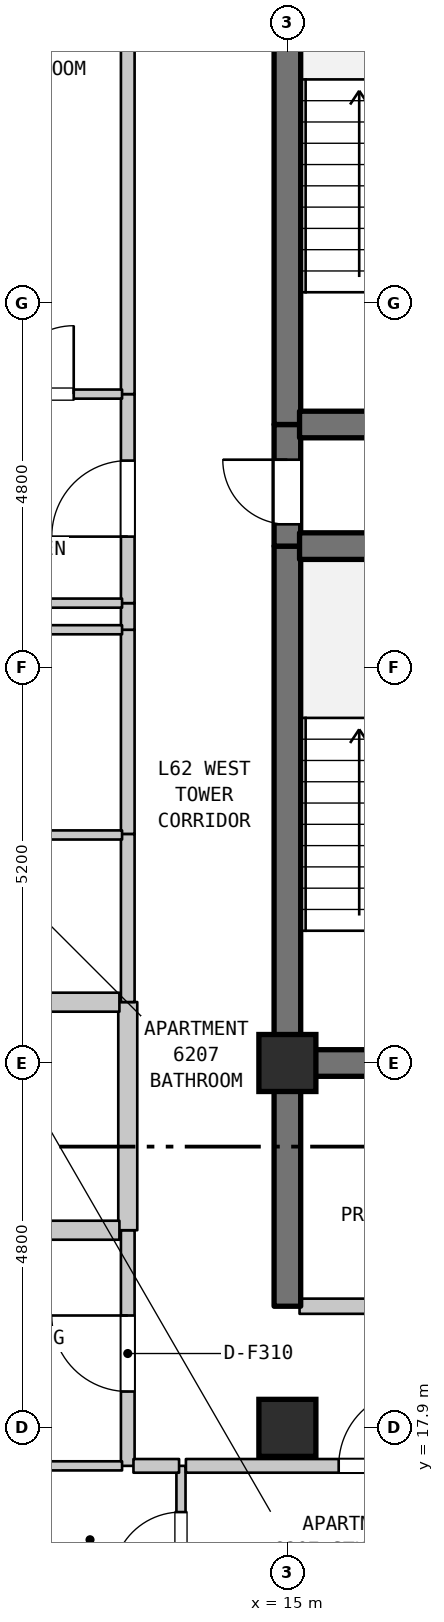
"""IFC4 building model, lengths in metres.
Left out: names, types, materials, properties, quantities, classifications, styles, units other than length and angle.
Written with IfcOpenShell. Run it as: python <this file> out.ifc"""

import sys

from ifc_helpers import new_model, si_unit, direction, frame, frame_2d, origin, origin_2d, place, context, subcontext, project, spatial, rectangle, extrude, element, fill, save


model = new_model("IFC4")
c1 = context("Model", 3, precision=1e-05, world=origin(), true_north=direction((0.0, 1.0)))
c2 = subcontext(c1, "Body", "Model", "MODEL_VIEW")
j1 = project(units=[si_unit("LENGTHUNIT", "METRE"), si_unit("PLANEANGLEUNIT", "RADIAN")], contexts=[c1])
p1 = place(None, origin())
s1 = spatial("IfcSite", under=j1, at=p1, CompositionType="ELEMENT")
p2 = place(p1, origin())
s2 = spatial("IfcBuilding", under=s1, at=p2, CompositionType="ELEMENT")
p3 = place(p2, frame((0.0, 0.0, 251.0)))
s3 = spatial("IfcBuildingStorey", under=s2, at=p3, CompositionType="ELEMENT", Elevation=251.0)
for number, where, z_axis, x_axis in (
    (1, (15.0, 17.9, 0.0), (0.0, 0.0, 1.0), (1.0, 0.0, 0.0)),
    (2, (15.0, 22.7, 0.0), (0.0, 0.0, 1.0), (1.0, 0.0, 0.0)),
):
    element("IfcColumn", number, at=place(p3, frame(where, z_axis=z_axis, x_axis=x_axis)), inside=s3, PredefinedType="COLUMN", context=c2, shape_type="SweptSolid", body=[
        extrude(rectangle(XDim=0.75, YDim=0.75, at=origin_2d()), origin(), (0.0, 0.0, 1.0), 3.7),
    ])
p4 = place(p3, frame((12.9, 17.4, 0.0), z_axis=(0.0, 0.0, 1.0), x_axis=(0.0, 1.0, 0.0)))
e3 = element("IfcWall", 3, at=p4, inside=s3, PredefinedType="STANDARD", context=c2, shape_type="SweptSolid", body=[
    extrude(rectangle(XDim=3.1, YDim=0.18, at=frame_2d((1.55, 0.0))), origin(), (0.0, 0.0, 1.0), 3.39),
])
p5 = place(p4, frame((0.978, 0.0, 0.0)))
e4 = element("IfcOpeningElement", 4, at=p5, cuts=e3, PredefinedType="OPENING", context=c2, shape_type="SweptSolid", body=[
    extrude(rectangle(XDim=1.0, YDim=2.15, at=frame_2d((0.5, 1.075))), frame((0.0, 0.1, 0.0), z_axis=(0.0, -1.0, 0.0), x_axis=(1.0, 0.0, 0.0)), (0.0, 0.0, 1.0), 0.2),
])
p6 = place(p3, frame((12.9, 20.5, 0.0), z_axis=(0.0, 0.0, 1.0), x_axis=(0.0, 1.0, 0.0)))
e5 = element("IfcWall", 5, at=p6, inside=s3, PredefinedType="STANDARD", context=c2, shape_type="SweptSolid", body=[
    extrude(rectangle(XDim=3.002, YDim=0.25, at=frame_2d((1.501, 0.0))), origin(), (0.0, 0.0, 1.0), 3.39),
])
p7 = place(p3, frame((12.9, 23.502, 0.0), z_axis=(0.0, 0.0, 1.0), x_axis=(0.0, 1.0, 0.0)))
e6 = element("IfcWall", 6, at=p7, inside=s3, PredefinedType="STANDARD", context=c2, shape_type="SweptSolid", body=[
    extrude(rectangle(XDim=2.212, YDim=0.18, at=frame_2d((1.106, 0.0))), origin(), (0.0, 0.0, 1.0), 3.39),
])
p8 = place(p3, frame((12.9, 25.714, 0.0), z_axis=(0.0, 0.0, 1.0), x_axis=(0.0, 1.0, 0.0)))
e7 = element("IfcWall", 7, at=p8, inside=s3, PredefinedType="STANDARD", context=c2, shape_type="SweptSolid", body=[
    extrude(rectangle(XDim=2.686, YDim=0.18, at=frame_2d((1.343, 0.0))), origin(), (0.0, 0.0, 1.0), 3.39),
])
p9 = place(p3, frame((12.9, 28.4, 0.0), z_axis=(0.0, 0.0, 1.0), x_axis=(0.0, 1.0, 0.0)))
e8 = element("IfcWall", 8, at=p9, inside=s3, PredefinedType="STANDARD", context=c2, shape_type="SweptSolid", body=[
    extrude(rectangle(XDim=0.35, YDim=0.18, at=frame_2d((0.175, 0.0))), origin(), (0.0, 0.0, 1.0), 3.39),
])
p10 = place(p3, frame((12.9, 28.75, 0.0), z_axis=(0.0, 0.0, 1.0), x_axis=(0.0, 1.0, 0.0)))
e9 = element("IfcWall", 9, at=p10, inside=s3, PredefinedType="STANDARD", context=c2, shape_type="SweptSolid", body=[
    extrude(rectangle(XDim=2.75, YDim=0.18, at=frame_2d((1.375, 0.0))), origin(), (0.0, 0.0, 1.0), 3.39),
])
p11 = place(p10, frame((0.875, 0.0, 0.0)))
e10 = element("IfcOpeningElement", 10, at=p11, cuts=e9, PredefinedType="OPENING", context=c2, shape_type="SweptSolid", body=[
    extrude(rectangle(XDim=1.0, YDim=2.15, at=frame_2d((0.5, 1.075))), frame((0.0, 0.1, 0.0), z_axis=(0.0, -1.0, 0.0), x_axis=(1.0, 0.0, 0.0)), (0.0, 0.0, 1.0), 0.2),
])
p12 = place(p3, frame((12.9, 31.5, 0.0), z_axis=(0.0, 0.0, 1.0), x_axis=(0.0, 1.0, 0.0)))
e11 = element("IfcWall", 11, at=p12, inside=s3, PredefinedType="STANDARD", context=c2, shape_type="SweptSolid", body=[
    extrude(rectangle(XDim=8.6, YDim=0.18, at=frame_2d((4.3, 0.0))), origin(), (0.0, 0.0, 1.0), 3.39),
])
p13 = place(p3, frame((13.6, 15.45, 0.0), z_axis=(0.0, 0.0, 1.0), x_axis=(0.0, 1.0, 0.0)))
e12 = element("IfcWall", 12, at=p13, inside=s3, PredefinedType="PARTITIONING", context=c2, shape_type="SweptSolid", body=[
    extrude(rectangle(XDim=1.95, YDim=0.12, at=frame_2d((0.975, 0.0))), origin(), (0.0, 0.0, 1.0), 3.39),
])
p14 = place(p13, frame((0.442, 0.0, 0.0)))
e13 = element("IfcOpeningElement", 13, at=p14, cuts=e12, PredefinedType="OPENING", context=c2, shape_type="SweptSolid", body=[
    extrude(rectangle(XDim=0.9, YDim=2.15, at=frame_2d((0.45, 1.075))), frame((0.0, 0.07, 0.0), z_axis=(0.0, -1.0, 0.0), x_axis=(1.0, 0.0, 0.0)), (0.0, 0.0, 1.0), 0.14),
])
p15 = place(p3, frame((15.0, 19.5, 0.0), z_axis=(0.0, 0.0, 1.0), x_axis=(0.0, 1.0, 0.0)))
e14 = element("IfcWall", 14, at=p15, inside=s3, PredefinedType="SHEAR", context=c2, shape_type="SweptSolid", body=[
    extrude(rectangle(XDim=3.2, YDim=0.35, at=frame_2d((1.6, 0.0))), origin(), (0.0, 0.0, 1.0), 3.39),
])
p16 = place(p3, frame((15.0, 22.7, 0.0), z_axis=(0.0, 0.0, 1.0), x_axis=(0.0, 1.0, 0.0)))
e15 = element("IfcWall", 15, at=p16, inside=s3, PredefinedType="SHEAR", context=c2, shape_type="SweptSolid", body=[
    extrude(rectangle(XDim=6.8, YDim=0.35, at=frame_2d((3.4, 0.0))), origin(), (0.0, 0.0, 1.0), 3.39),
])
p17 = place(p3, frame((15.0, 29.5, 0.0), z_axis=(0.0, 0.0, 1.0), x_axis=(0.0, 1.0, 0.0)))
e16 = element("IfcWall", 16, at=p17, inside=s3, PredefinedType="SHEAR", context=c2, shape_type="SweptSolid", body=[
    extrude(rectangle(XDim=1.6, YDim=0.35, at=frame_2d((0.8, 0.0))), origin(), (0.0, 0.0, 1.0), 3.39),
])
p18 = place(p17, frame((0.287, 0.0, 0.0)))
e17 = element("IfcOpeningElement", 17, at=p18, cuts=e16, PredefinedType="OPENING", context=c2, shape_type="SweptSolid", body=[
    extrude(rectangle(XDim=0.85, YDim=2.1, at=frame_2d((0.425, 1.05))), frame((0.0, 0.185, 0.0), z_axis=(0.0, -1.0, 0.0), x_axis=(1.0, 0.0, 0.0)), (0.0, 0.0, 1.0), 0.37),
])
p19 = place(p3, frame((15.0, 31.1, 0.0), z_axis=(0.0, 0.0, 1.0), x_axis=(0.0, 1.0, 0.0)))
e18 = element("IfcWall", 18, at=p19, inside=s3, PredefinedType="SHEAR", context=c2, shape_type="SweptSolid", body=[
    extrude(rectangle(XDim=6.8, YDim=0.35, at=frame_2d((3.4, 0.0))), origin(), (0.0, 0.0, 1.0), 3.39),
])
p20 = place(p3, frame((11.47, 17.4, 0.0), z_axis=(0.0, 0.0, 1.0), x_axis=(1.0, 0.0, 0.0)))
e19 = element("IfcWall", 19, at=p20, inside=s3, PredefinedType="PARTITIONING", context=c2, shape_type="SweptSolid", body=[
    extrude(rectangle(XDim=1.355, YDim=0.12, at=frame_2d((0.677, 0.0))), origin(), (0.0, 0.0, 1.0), 3.39),
])
p21 = place(p3, frame((12.975, 17.4, 0.0), z_axis=(0.0, 0.0, 1.0), x_axis=(1.0, 0.0, 0.0)))
e20 = element("IfcWall", 20, at=p21, inside=s3, PredefinedType="STANDARD", context=c2, shape_type="SweptSolid", body=[
    extrude(rectangle(XDim=0.6, YDim=0.18, at=frame_2d((0.3, 0.0))), origin(), (0.0, 0.0, 1.0), 3.39),
])
p22 = place(p3, frame((13.665, 17.4, 0.0), z_axis=(0.0, 0.0, 1.0), x_axis=(1.0, 0.0, 0.0)))
e21 = element("IfcWall", 21, at=p22, inside=s3, PredefinedType="STANDARD", context=c2, shape_type="SweptSolid", body=[
    extrude(rectangle(XDim=3.69, YDim=0.18, at=frame_2d((1.845, 0.0))), origin(), (0.0, 0.0, 1.0), 3.39),
])
p23 = place(p22, frame((2.01, 0.0, 0.0)))
e22 = element("IfcOpeningElement", 22, at=p23, cuts=e21, PredefinedType="OPENING", context=c2, shape_type="SweptSolid", body=[
    extrude(rectangle(XDim=1.0, YDim=2.15, at=frame_2d((0.5, 1.075))), frame((0.0, 0.1, 0.0), z_axis=(0.0, -1.0, 0.0), x_axis=(1.0, 0.0, 0.0)), (0.0, 0.0, 1.0), 0.2),
])
p24 = place(p3, frame((15.16, 19.5, 0.0), z_axis=(0.0, 0.0, 1.0), x_axis=(1.0, 0.0, 0.0)))
e23 = element("IfcWall", 23, at=p24, inside=s3, PredefinedType="STANDARD", context=c2, shape_type="SweptSolid", body=[
    extrude(rectangle(XDim=3.68, YDim=0.2, at=frame_2d((1.84, 0.0))), origin(), (0.0, 0.0, 1.0), 3.39),
])
p25 = place(p24, frame((1.39, 0.0, 0.0)))
e24 = element("IfcOpeningElement", 24, at=p25, cuts=e23, PredefinedType="OPENING", context=c2, shape_type="SweptSolid", body=[
    extrude(rectangle(XDim=0.9, YDim=2.15, at=frame_2d((0.45, 1.075))), frame((0.0, 0.11, 0.0), z_axis=(0.0, -1.0, 0.0), x_axis=(1.0, 0.0, 0.0)), (0.0, 0.0, 1.0), 0.22),
])
p26 = place(p3, frame((10.76, 20.5, 0.0), z_axis=(0.0, 0.0, 1.0), x_axis=(1.0, 0.0, 0.0)))
e25 = element("IfcWall", 25, at=p26, inside=s3, PredefinedType="STANDARD", context=c2, shape_type="SweptSolid", body=[
    extrude(rectangle(XDim=2.03, YDim=0.25, at=frame_2d((1.015, 0.0))), origin(), (0.0, 0.0, 1.0), 3.39),
])
p27 = place(p3, frame((15.16, 22.7, 0.0), z_axis=(0.0, 0.0, 1.0), x_axis=(1.0, 0.0, 0.0)))
e26 = element("IfcWall", 26, at=p27, inside=s3, PredefinedType="SHEAR", context=c2, shape_type="SweptSolid", body=[
    extrude(rectangle(XDim=3.68, YDim=0.35, at=frame_2d((1.84, 0.0))), origin(), (0.0, 0.0, 1.0), 3.39),
])
p28 = place(p3, frame((10.76, 23.5, 0.0), z_axis=(0.0, 0.0, 1.0), x_axis=(1.0, 0.0, 0.0)))
e27 = element("IfcWall", 27, at=p28, inside=s3, PredefinedType="STANDARD", context=c2, shape_type="SweptSolid", body=[
    extrude(rectangle(XDim=2.03, YDim=0.25, at=frame_2d((1.015, 0.0))), origin(), (0.0, 0.0, 1.0), 3.39),
])
for number, where, z_axis, x_axis in (
    (28, (10.695, 25.7, 0.0), (0.0, 0.0, 1.0), (1.0, 0.0, 0.0)),
    (29, (10.695, 28.4, 0.0), (0.0, 0.0, 1.0), (1.0, 0.0, 0.0)),
):
    element("IfcWall", number, at=place(p3, frame(where, z_axis=z_axis, x_axis=x_axis)), inside=s3, PredefinedType="PARTITIONING", context=c2, shape_type="SweptSolid", body=[
        extrude(rectangle(XDim=2.13, YDim=0.12, at=frame_2d((1.065, 0.0))), origin(), (0.0, 0.0, 1.0), 3.39),
    ])
p29 = place(p3, frame((9.175, 28.75, 0.0), z_axis=(0.0, 0.0, 1.0), x_axis=(1.0, 0.0, 0.0)))
e30 = element("IfcWall", 30, at=p29, inside=s3, PredefinedType="PARTITIONING", context=c2, shape_type="SweptSolid", body=[
    extrude(rectangle(XDim=3.65, YDim=0.12, at=frame_2d((1.825, 0.0))), origin(), (0.0, 0.0, 1.0), 3.39),
])
for number, where, z_axis, x_axis in (
    (31, (15.16, 29.5, 0.0), (0.0, 0.0, 1.0), (1.0, 0.0, 0.0)),
    (32, (15.16, 31.1, 0.0), (0.0, 0.0, 1.0), (1.0, 0.0, 0.0)),
):
    element("IfcWall", number, at=place(p3, frame(where, z_axis=z_axis, x_axis=x_axis)), inside=s3, PredefinedType="SHEAR", context=c2, shape_type="SweptSolid", body=[
        extrude(rectangle(XDim=3.68, YDim=0.35, at=frame_2d((1.84, 0.0))), origin(), (0.0, 0.0, 1.0), 3.39),
    ])
p30 = place(p3, frame((10.623, 31.5, 0.0), z_axis=(0.0, 0.0, 1.0), x_axis=(1.0, 0.0, 0.0)))
e33 = element("IfcWall", 33, at=p30, inside=s3, PredefinedType="PARTITIONING", context=c2, shape_type="SweptSolid", body=[
    extrude(rectangle(XDim=2.202, YDim=0.12, at=frame_2d((1.101, 0.0))), origin(), (0.0, 0.0, 1.0), 3.39),
])
p31 = place(p30, frame((0.666, 0.0, 0.0)))
e34 = element("IfcOpeningElement", 34, at=p31, cuts=e33, PredefinedType="OPENING", context=c2, shape_type="SweptSolid", body=[
    extrude(rectangle(XDim=0.9, YDim=2.1, at=frame_2d((0.45, 1.05))), frame((0.0, 0.07, 0.0), z_axis=(0.0, -1.0, 0.0), x_axis=(1.0, 0.0, 0.0)), (0.0, 0.0, 1.0), 0.14),
])
p32 = place(p5, origin())
e35 = element("IfcDoor", 35, at=p32, inside=s3, OperationType="SINGLE_SWING_RIGHT", PredefinedType="DOOR", context=c2, shape_type="SweptSolid", body=[
    extrude(rectangle(XDim=1.0, YDim=2.15, at=frame_2d((0.5, 1.075))), frame((0.0, 0.025, 0.0), z_axis=(0.0, -1.0, 0.0), x_axis=(1.0, 0.0, 0.0)), (0.0, 0.0, 1.0), 0.05),
])
fill(e4, e35)
p33 = place(p11, origin())
e36 = element("IfcDoor", 36, at=p33, inside=s3, OperationType="SINGLE_SWING_LEFT", PredefinedType="DOOR", context=c2, shape_type="SweptSolid", body=[
    extrude(rectangle(XDim=1.0, YDim=2.15, at=frame_2d((0.5, 1.075))), frame((0.0, 0.025, 0.0), z_axis=(0.0, -1.0, 0.0), x_axis=(1.0, 0.0, 0.0)), (0.0, 0.0, 1.0), 0.05),
])
fill(e10, e36)
p34 = place(p14, origin())
e37 = element("IfcDoor", 37, at=p34, inside=s3, OperationType="SINGLE_SWING_LEFT", PredefinedType="DOOR", context=c2, shape_type="SweptSolid", body=[
    extrude(rectangle(XDim=0.9, YDim=2.15, at=frame_2d((0.45, 1.075))), frame((0.0, 0.025, 0.0), z_axis=(0.0, -1.0, 0.0), x_axis=(1.0, 0.0, 0.0)), (0.0, 0.0, 1.0), 0.05),
])
fill(e13, e37)
p35 = place(p18, origin())
e38 = element("IfcDoor", 38, at=p35, inside=s3, OperationType="SINGLE_SWING_RIGHT", PredefinedType="DOOR", context=c2, shape_type="SweptSolid", body=[
    extrude(rectangle(XDim=0.85, YDim=2.1, at=frame_2d((0.425, 1.05))), frame((0.0, 0.025, 0.0), z_axis=(0.0, -1.0, 0.0), x_axis=(1.0, 0.0, 0.0)), (0.0, 0.0, 1.0), 0.05),
])
fill(e17, e38)
p36 = place(p23, origin())
e39 = element("IfcDoor", 39, at=p36, inside=s3, OperationType="SINGLE_SWING_RIGHT", PredefinedType="DOOR", context=c2, shape_type="SweptSolid", body=[
    extrude(rectangle(XDim=1.0, YDim=2.15, at=frame_2d((0.5, 1.075))), frame((0.0, 0.025, 0.0), z_axis=(0.0, -1.0, 0.0), x_axis=(1.0, 0.0, 0.0)), (0.0, 0.0, 1.0), 0.05),
])
fill(e22, e39)
p37 = place(p31, origin())
e40 = element("IfcDoor", 40, at=p37, inside=s3, OperationType="SINGLE_SWING_RIGHT", PredefinedType="DOOR", context=c2, shape_type="SweptSolid", body=[
    extrude(rectangle(XDim=0.9, YDim=2.1, at=frame_2d((0.45, 1.05))), frame((0.0, 0.025, 0.0), z_axis=(0.0, -1.0, 0.0), x_axis=(1.0, 0.0, 0.0)), (0.0, 0.0, 1.0), 0.05),
])
fill(e34, e40)
save(model, sys.argv[1])
